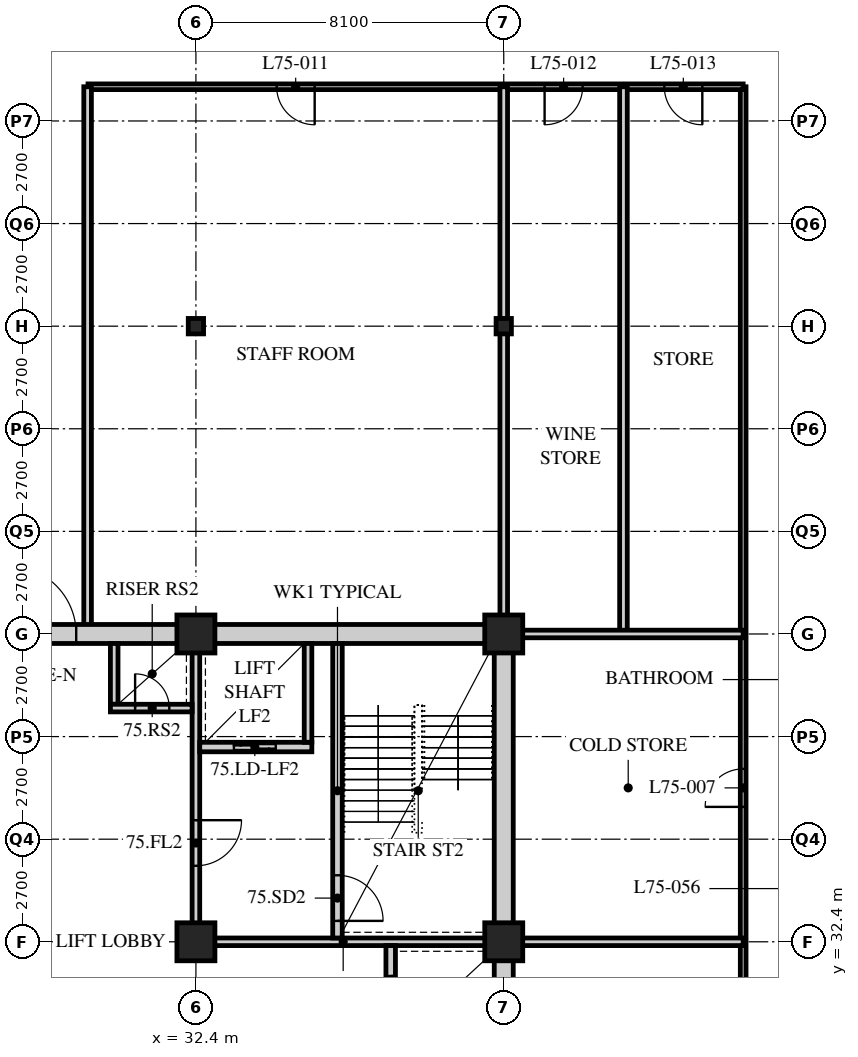
"""IFC4 building model, lengths in metres.
Left out: names, types, materials, properties, quantities, classifications, styles, units other than length and angle.
Written with IfcOpenShell. Run it as: python <this file> out.ifc"""

import sys

from ifc_helpers import new_model, si_unit, direction, frame, frame_2d, origin, origin_2d, place, context, subcontext, project, spatial, rectangle, hollow_rectangle, i_section, extrude, element, fill, save


model = new_model("IFC4")
c1 = context("Model", 3, precision=1e-05, world=origin(), true_north=direction((0.0, 1.0)))
c2 = subcontext(c1, "Body", "Model", "MODEL_VIEW")
j1 = project(units=[si_unit("LENGTHUNIT", "METRE"), si_unit("PLANEANGLEUNIT", "RADIAN")], contexts=[c1])
p1 = place(None, origin())
s1 = spatial("IfcSite", under=j1, at=p1, CompositionType="ELEMENT")
p2 = place(p1, origin())
s2 = spatial("IfcBuilding", under=s1, at=p2, CompositionType="ELEMENT")
p3 = place(p2, frame((0.0, 0.0, 293.1)))
s3 = spatial("IfcBuildingStorey", under=s2, at=p3, CompositionType="ELEMENT", Elevation=293.1)
for number, where, z_axis, x_axis in (
    (1, (32.4, 32.4, 0.0), (0.0, 0.0, 1.0), (1.0, 0.0, 0.0)),
    (2, (32.4, 40.5, 0.0), (0.0, 0.0, 1.0), (1.0, 0.0, 0.0)),
):
    element("IfcColumn", number, at=place(p3, frame(where, z_axis=z_axis, x_axis=x_axis)), inside=s3, PredefinedType="COLUMN", context=c2, shape_type="SweptSolid", body=[
        extrude(hollow_rectangle(XDim=1.0, YDim=1.0, WallThickness=0.1, at=origin_2d()), origin(), (0.0, 0.0, 1.0), 5.4),
    ])
p4 = place(p3, frame((32.4, 48.6, 0.0), z_axis=(0.0, 0.0, 1.0), x_axis=(1.0, 0.0, 0.0)))
e3 = element("IfcColumn", 3, at=p4, inside=s3, PredefinedType="COLUMN", context=c2, shape_type="SweptSolid", body=[
    extrude(i_section(OverallWidth=0.403, OverallDepth=0.406, WebThickness=0.027, FlangeThickness=0.043, FilletRadius=0.015, at=origin_2d()), origin(), (0.0, 0.0, 1.0), 5.4),
])
for number, where, z_axis, x_axis in (
    (4, (40.5, 32.4, 0.0), (0.0, 0.0, 1.0), (1.0, 0.0, 0.0)),
    (5, (40.5, 40.5, 0.0), (0.0, 0.0, 1.0), (1.0, 0.0, 0.0)),
):
    element("IfcColumn", number, at=place(p3, frame(where, z_axis=z_axis, x_axis=x_axis)), inside=s3, PredefinedType="COLUMN", context=c2, shape_type="SweptSolid", body=[
        extrude(hollow_rectangle(XDim=1.0, YDim=1.0, WallThickness=0.1, at=origin_2d()), origin(), (0.0, 0.0, 1.0), 5.4),
    ])
p5 = place(p3, frame((40.5, 48.6, 0.0), z_axis=(0.0, 0.0, 1.0), x_axis=(1.0, 0.0, 0.0)))
e6 = element("IfcColumn", 6, at=p5, inside=s3, PredefinedType="COLUMN", context=c2, shape_type="SweptSolid", body=[
    extrude(i_section(OverallWidth=0.403, OverallDepth=0.406, WebThickness=0.027, FlangeThickness=0.043, FilletRadius=0.015, at=origin_2d()), origin(), (0.0, 0.0, 1.0), 5.4),
])
p6 = place(p3, frame((46.8, 24.3, 0.0), z_axis=(0.0, 0.0, 1.0), x_axis=(0.0, 1.0, 0.0)))
e7 = element("IfcWall", 7, at=p6, inside=s3, PredefinedType="PARTITIONING", context=c2, shape_type="SweptSolid", body=[
    extrude(rectangle(XDim=30.6, YDim=0.15, at=frame_2d((15.3, 0.0))), origin(), (0.0, 0.0, 1.0), 5.19),
])
p7 = place(p6, frame((0.775, 0.0, 0.0)))
e8 = element("IfcOpeningElement", 8, at=p7, cuts=e7, PredefinedType="OPENING", context=c2, shape_type="SweptSolid", body=[
    extrude(rectangle(XDim=0.85, YDim=2.1, at=frame_2d((0.425, 1.05))), frame((0.0, 0.085, 0.0), z_axis=(0.0, -1.0, 0.0), x_axis=(1.0, 0.0, 0.0)), (0.0, 0.0, 1.0), 0.17),
])
p8 = place(p6, frame((4.75, 0.0, 0.0)))
e9 = element("IfcOpeningElement", 9, at=p8, cuts=e7, PredefinedType="OPENING", context=c2, shape_type="SweptSolid", body=[
    extrude(rectangle(XDim=1.0, YDim=2.1, at=frame_2d((0.5, 1.05))), frame((0.0, 0.085, 0.0), z_axis=(0.0, -1.0, 0.0), x_axis=(1.0, 0.0, 0.0)), (0.0, 0.0, 1.0), 0.17),
])
p9 = place(p6, frame((11.65, 0.0, 0.0)))
e10 = element("IfcOpeningElement", 10, at=p9, cuts=e7, PredefinedType="OPENING", context=c2, shape_type="SweptSolid", body=[
    extrude(rectangle(XDim=1.0, YDim=2.1, at=frame_2d((0.5, 1.05))), frame((0.0, 0.085, 0.0), z_axis=(0.0, -1.0, 0.0), x_axis=(1.0, 0.0, 0.0)), (0.0, 0.0, 1.0), 0.17),
])
p10 = place(p3, frame((46.8, 54.9, 0.0), z_axis=(0.0, 0.0, 1.0), x_axis=(-1.0, 0.0, 0.0)))
e11 = element("IfcWall", 11, at=p10, inside=s3, PredefinedType="PARTITIONING", context=c2, shape_type="SweptSolid", body=[
    extrude(rectangle(XDim=17.24, YDim=0.15, at=frame_2d((8.62, 0.0))), origin(), (0.0, 0.0, 1.0), 5.19),
])
p11 = place(p10, frame((11.275, 0.0, 0.0)))
e12 = element("IfcOpeningElement", 12, at=p11, cuts=e11, PredefinedType="OPENING", context=c2, shape_type="SweptSolid", body=[
    extrude(rectangle(XDim=1.0, YDim=2.1, at=frame_2d((0.5, 1.05))), frame((0.0, 0.085, 0.0), z_axis=(0.0, -1.0, 0.0), x_axis=(1.0, 0.0, 0.0)), (0.0, 0.0, 1.0), 0.17),
])
p12 = place(p10, frame((4.225, 0.0, 0.0)))
e13 = element("IfcOpeningElement", 13, at=p12, cuts=e11, PredefinedType="OPENING", context=c2, shape_type="SweptSolid", body=[
    extrude(rectangle(XDim=1.0, YDim=2.1, at=frame_2d((0.5, 1.05))), frame((0.0, 0.085, 0.0), z_axis=(0.0, -1.0, 0.0), x_axis=(1.0, 0.0, 0.0)), (0.0, 0.0, 1.0), 0.17),
])
p13 = place(p10, frame((1.075, 0.0, 0.0)))
e14 = element("IfcOpeningElement", 14, at=p13, cuts=e11, PredefinedType="OPENING", context=c2, shape_type="SweptSolid", body=[
    extrude(rectangle(XDim=1.0, YDim=2.1, at=frame_2d((0.5, 1.05))), frame((0.0, 0.085, 0.0), z_axis=(0.0, -1.0, 0.0), x_axis=(1.0, 0.0, 0.0)), (0.0, 0.0, 1.0), 0.17),
])
p14 = place(p3, frame((40.5, 32.4, 0.0), z_axis=(0.0, 0.0, 1.0), x_axis=(1.0, 0.0, 0.0)))
e15 = element("IfcWall", 15, at=p14, inside=s3, PredefinedType="SOLIDWALL", context=c2, shape_type="SweptSolid", body=[
    extrude(rectangle(XDim=6.3, YDim=0.2, at=frame_2d((3.15, 0.0))), origin(), (0.0, 0.0, 1.0), 4.271),
])
p15 = place(p3, frame((40.5, 40.5, 0.0), z_axis=(0.0, 0.0, 1.0), x_axis=(0.0, 1.0, 0.0)))
e16 = element("IfcWall", 16, at=p15, inside=s3, PredefinedType="SOLIDWALL", context=c2, shape_type="SweptSolid", body=[
    extrude(rectangle(XDim=14.4, YDim=0.2, at=frame_2d((7.2, 0.0))), origin(), (0.0, 0.0, 1.0), 4.271),
])
for number, where, z_axis, x_axis in (
    (17, (43.65, 54.9, 0.0), (0.0, 0.0, 1.0), (0.0, -1.0, 0.0)),
    (18, (29.55, 40.5, 0.0), (0.0, 0.0, 1.0), (0.0, 1.0, 0.0)),
):
    element("IfcWall", number, at=place(p3, frame(where, z_axis=z_axis, x_axis=x_axis)), inside=s3, PredefinedType="SOLIDWALL", context=c2, shape_type="SweptSolid", body=[
        extrude(rectangle(XDim=14.4, YDim=0.2, at=frame_2d((7.2, 0.0))), origin(), (0.0, 0.0, 1.0), 5.19),
    ])
p16 = place(p3, frame((40.5, 40.5, 0.0), z_axis=(0.0, 0.0, 1.0), x_axis=(1.0, 0.0, 0.0)))
e19 = element("IfcWall", 19, at=p16, inside=s3, PredefinedType="SOLIDWALL", context=c2, shape_type="SweptSolid", body=[
    extrude(rectangle(XDim=6.3, YDim=0.2, at=frame_2d((3.15, 0.0))), origin(), (0.0, 0.0, 1.0), 4.271),
])
p17 = place(p3, frame((15.95, 40.5, 0.0), z_axis=(0.0, 0.0, 1.0), x_axis=(1.0, 0.0, 0.0)))
e20 = element("IfcWall", 20, at=p17, inside=s3, PredefinedType="SOLIDWALL", context=c2, shape_type="SweptSolid", body=[
    extrude(rectangle(XDim=24.8, YDim=0.5, at=frame_2d((12.4, 0.0))), origin(), (0.0, 0.0, 1.0), 4.271),
])
p18 = place(p17, frame((11.5, 0.0, 0.0)))
e21 = element("IfcOpeningElement", 21, at=p18, cuts=e20, PredefinedType="OPENING", context=c2, shape_type="SweptSolid", body=[
    extrude(rectangle(XDim=1.8, YDim=2.4, at=frame_2d((0.9, 1.2))), frame((0.0, 0.26, 0.0), z_axis=(0.0, -1.0, 0.0), x_axis=(1.0, 0.0, 0.0)), (0.0, 0.0, 1.0), 0.52),
])
p19 = place(p3, frame((40.5, 24.55, 0.0), z_axis=(0.0, 0.0, 1.0), x_axis=(0.0, 1.0, 0.0)))
e22 = element("IfcWall", 22, at=p19, inside=s3, PredefinedType="SOLIDWALL", context=c2, shape_type="SweptSolid", body=[
    extrude(rectangle(XDim=15.7, YDim=0.5, at=frame_2d((7.85, 0.0))), origin(), (0.0, 0.0, 1.0), 4.271),
])
p20 = place(p3, frame((32.3, 32.4, 0.0), z_axis=(0.0, 0.0, 1.0), x_axis=(1.0, 0.0, 0.0)))
e23 = element("IfcWall", 23, at=p20, inside=s3, PredefinedType="SOLIDWALL", context=c2, shape_type="SweptSolid", body=[
    extrude(rectangle(XDim=7.95, YDim=0.2, at=frame_2d((3.975, 0.0))), origin(), (0.0, 0.0, 1.0), 4.428),
])
p21 = place(p3, frame((32.4, 32.5, 0.0), z_axis=(0.0, 0.0, 1.0), x_axis=(0.0, 1.0, 0.0)))
e24 = element("IfcWall", 24, at=p21, inside=s3, PredefinedType="SOLIDWALL", context=c2, shape_type="SweptSolid", body=[
    extrude(rectangle(XDim=7.75, YDim=0.2, at=frame_2d((3.875, 0.0))), origin(), (0.0, 0.0, 1.0), 4.428),
])
p22 = place(p21, frame((1.9, 0.0, 0.0)))
e25 = element("IfcOpeningElement", 25, at=p22, cuts=e24, PredefinedType="OPENING", context=c2, shape_type="SweptSolid", body=[
    extrude(rectangle(XDim=1.2, YDim=2.1, at=frame_2d((0.6, 1.05))), frame((0.0, 0.11, 0.0), z_axis=(0.0, -1.0, 0.0), x_axis=(1.0, 0.0, 0.0)), (0.0, 0.0, 1.0), 0.22),
])
p23 = place(p3, frame((37.525, 24.55, 0.0), z_axis=(0.0, 0.0, 1.0), x_axis=(0.0, 1.0, 0.0)))
e26 = element("IfcWall", 26, at=p23, inside=s3, PredefinedType="SOLIDWALL", context=c2, shape_type="SweptSolid", body=[
    extrude(rectangle(XDim=7.75, YDim=0.25, at=frame_2d((3.875, 0.0))), origin(), (0.0, 0.0, 1.0), 5.19),
])
p24 = place(p23, frame((0.65, 0.0, 0.0)))
e27 = element("IfcOpeningElement", 27, at=p24, cuts=e26, PredefinedType="OPENING", context=c2, shape_type="SweptSolid", body=[
    extrude(rectangle(XDim=1.1, YDim=2.4, at=frame_2d((0.55, 1.2))), frame((0.0, 0.135, 0.0), z_axis=(0.0, -1.0, 0.0), x_axis=(1.0, 0.0, 0.0)), (0.0, 0.0, 1.0), 0.27),
])
p25 = place(p23, frame((3.25, 0.0, 0.0)))
e28 = element("IfcOpeningElement", 28, at=p25, cuts=e26, PredefinedType="OPENING", context=c2, shape_type="SweptSolid", body=[
    extrude(rectangle(XDim=1.1, YDim=2.4, at=frame_2d((0.55, 1.2))), frame((0.0, 0.135, 0.0), z_axis=(0.0, -1.0, 0.0), x_axis=(1.0, 0.0, 0.0)), (0.0, 0.0, 1.0), 0.27),
])
p26 = place(p23, frame((5.85, 0.0, 0.0)))
e29 = element("IfcOpeningElement", 29, at=p26, cuts=e26, PredefinedType="OPENING", context=c2, shape_type="SweptSolid", body=[
    extrude(rectangle(XDim=1.1, YDim=2.4, at=frame_2d((0.55, 1.2))), frame((0.0, 0.135, 0.0), z_axis=(0.0, -1.0, 0.0), x_axis=(1.0, 0.0, 0.0)), (0.0, 0.0, 1.0), 0.27),
])
p27 = place(p3, frame((36.125, 32.5, 0.0), z_axis=(0.0, 0.0, 1.0), x_axis=(0.0, 1.0, 0.0)))
e30 = element("IfcWall", 30, at=p27, inside=s3, PredefinedType="SOLIDWALL", context=c2, shape_type="SweptSolid", body=[
    extrude(rectangle(XDim=7.75, YDim=0.25, at=frame_2d((3.875, 0.0))), origin(), (0.0, 0.0, 1.0), 5.19),
])
p28 = place(p27, frame((0.45, 0.0, 0.0)))
e31 = element("IfcOpeningElement", 31, at=p28, cuts=e30, PredefinedType="OPENING", context=c2, shape_type="SweptSolid", body=[
    extrude(rectangle(XDim=1.2, YDim=2.1, at=frame_2d((0.6, 1.05))), frame((0.0, 0.135, 0.0), z_axis=(0.0, -1.0, 0.0), x_axis=(1.0, 0.0, 0.0)), (0.0, 0.0, 1.0), 0.27),
])
p29 = place(p3, frame((32.5, 37.525, 0.0), z_axis=(0.0, 0.0, 1.0), x_axis=(1.0, 0.0, 0.0)))
e32 = element("IfcWall", 32, at=p29, inside=s3, PredefinedType="SOLIDWALL", context=c2, shape_type="SweptSolid", body=[
    extrude(rectangle(XDim=2.95, YDim=0.25, at=frame_2d((1.475, 0.0))), origin(), (0.0, 0.0, 1.0), 5.19),
])
p30 = place(p29, frame((0.9, 0.0, 0.0)))
e33 = element("IfcOpeningElement", 33, at=p30, cuts=e32, PredefinedType="OPENING", context=c2, shape_type="SweptSolid", body=[
    extrude(rectangle(XDim=1.1, YDim=2.4, at=frame_2d((0.55, 1.2))), frame((0.0, 0.135, 0.0), z_axis=(0.0, -1.0, 0.0), x_axis=(1.0, 0.0, 0.0)), (0.0, 0.0, 1.0), 0.27),
])
p31 = place(p3, frame((35.35, 37.65, 0.0), z_axis=(0.0, 0.0, 1.0), x_axis=(0.0, 1.0, 0.0)))
e34 = element("IfcWall", 34, at=p31, inside=s3, PredefinedType="SOLIDWALL", context=c2, shape_type="SweptSolid", body=[
    extrude(rectangle(XDim=2.6, YDim=0.2, at=frame_2d((1.3, 0.0))), origin(), (0.0, 0.0, 1.0), 5.19),
])
p32 = place(p3, frame((30.25, 38.65, 0.0), z_axis=(0.0, 0.0, 1.0), x_axis=(0.0, 1.0, 0.0)))
e35 = element("IfcWall", 35, at=p32, inside=s3, PredefinedType="SOLIDWALL", context=c2, shape_type="SweptSolid", body=[
    extrude(rectangle(XDim=1.6, YDim=0.2, at=frame_2d((0.8, 0.0))), origin(), (0.0, 0.0, 1.0), 5.19),
])
p33 = place(p3, frame((30.15, 38.55, 0.0), z_axis=(0.0, 0.0, 1.0), x_axis=(1.0, 0.0, 0.0)))
e36 = element("IfcWall", 36, at=p33, inside=s3, PredefinedType="SOLIDWALL", context=c2, shape_type="SweptSolid", body=[
    extrude(rectangle(XDim=2.15, YDim=0.2, at=frame_2d((1.075, 0.0))), origin(), (0.0, 0.0, 1.0), 5.19),
])
p34 = place(p33, frame((0.65, 0.0, 0.0)))
e37 = element("IfcOpeningElement", 37, at=p34, cuts=e36, PredefinedType="OPENING", context=c2, shape_type="SweptSolid", body=[
    extrude(rectangle(XDim=0.9, YDim=2.1, at=frame_2d((0.45, 1.05))), frame((0.0, 0.11, 0.0), z_axis=(0.0, -1.0, 0.0), x_axis=(1.0, 0.0, 0.0)), (0.0, 0.0, 1.0), 0.22),
])
p35 = place(p9, origin())
e38 = element("IfcDoor", 38, at=p35, inside=s3, OperationType="SINGLE_SWING_LEFT", PredefinedType="DOOR", context=c2, shape_type="SweptSolid", body=[
    extrude(rectangle(XDim=1.0, YDim=2.1, at=frame_2d((0.5, 1.05))), frame((0.0, 0.025, 0.0), z_axis=(0.0, -1.0, 0.0), x_axis=(1.0, 0.0, 0.0)), (0.0, 0.0, 1.0), 0.05),
])
fill(e10, e38)
p36 = place(p11, origin())
e39 = element("IfcDoor", 39, at=p36, inside=s3, OperationType="SINGLE_SWING_LEFT", PredefinedType="DOOR", context=c2, shape_type="SweptSolid", body=[
    extrude(rectangle(XDim=1.0, YDim=2.1, at=frame_2d((0.5, 1.05))), frame((0.0, 0.025, 0.0), z_axis=(0.0, -1.0, 0.0), x_axis=(1.0, 0.0, 0.0)), (0.0, 0.0, 1.0), 0.05),
])
fill(e12, e39)
p37 = place(p12, origin())
e40 = element("IfcDoor", 40, at=p37, inside=s3, OperationType="SINGLE_SWING_RIGHT", PredefinedType="DOOR", context=c2, shape_type="SweptSolid", body=[
    extrude(rectangle(XDim=1.0, YDim=2.1, at=frame_2d((0.5, 1.05))), frame((0.0, 0.025, 0.0), z_axis=(0.0, -1.0, 0.0), x_axis=(1.0, 0.0, 0.0)), (0.0, 0.0, 1.0), 0.05),
])
fill(e13, e40)
p38 = place(p13, origin())
e41 = element("IfcDoor", 41, at=p38, inside=s3, OperationType="SINGLE_SWING_LEFT", PredefinedType="DOOR", context=c2, shape_type="SweptSolid", body=[
    extrude(rectangle(XDim=1.0, YDim=2.1, at=frame_2d((0.5, 1.05))), frame((0.0, 0.025, 0.0), z_axis=(0.0, -1.0, 0.0), x_axis=(1.0, 0.0, 0.0)), (0.0, 0.0, 1.0), 0.05),
])
fill(e14, e41)
p39 = place(p28, origin())
e42 = element("IfcDoor", 42, at=p39, inside=s3, OperationType="SINGLE_SWING_RIGHT", PredefinedType="DOOR", context=c2, shape_type="SweptSolid", body=[
    extrude(rectangle(XDim=1.2, YDim=2.1, at=frame_2d((0.6, 1.05))), frame((0.0, 0.025, 0.0), z_axis=(0.0, -1.0, 0.0), x_axis=(1.0, 0.0, 0.0)), (0.0, 0.0, 1.0), 0.05),
])
fill(e31, e42)
p40 = place(p22, origin())
e43 = element("IfcDoor", 43, at=p40, inside=s3, OperationType="SINGLE_SWING_LEFT", PredefinedType="DOOR", context=c2, shape_type="SweptSolid", body=[
    extrude(rectangle(XDim=1.2, YDim=2.1, at=frame_2d((0.6, 1.05))), frame((0.0, 0.025, 0.0), z_axis=(0.0, -1.0, 0.0), x_axis=(1.0, 0.0, 0.0)), (0.0, 0.0, 1.0), 0.05),
])
fill(e25, e43)
p41 = place(p34, origin())
e44 = element("IfcDoor", 44, at=p41, inside=s3, OperationType="SINGLE_SWING_LEFT", PredefinedType="DOOR", context=c2, shape_type="SweptSolid", body=[
    extrude(rectangle(XDim=0.9, YDim=2.1, at=frame_2d((0.45, 1.05))), frame((0.0, 0.025, 0.0), z_axis=(0.0, -1.0, 0.0), x_axis=(1.0, 0.0, 0.0)), (0.0, 0.0, 1.0), 0.05),
])
fill(e37, e44)
p42 = place(p26, origin())
e45 = element("IfcDoor", 45, at=p42, inside=s3, OperationType="DOUBLE_DOOR_SLIDING", PredefinedType="DOOR", context=c2, shape_type="SweptSolid", body=[
    extrude(rectangle(XDim=1.1, YDim=2.4, at=frame_2d((0.55, 1.2))), frame((0.0, 0.025, 0.0), z_axis=(0.0, -1.0, 0.0), x_axis=(1.0, 0.0, 0.0)), (0.0, 0.0, 1.0), 0.05),
])
fill(e29, e45)
p43 = place(p30, origin())
e46 = element("IfcDoor", 46, at=p43, inside=s3, OperationType="DOUBLE_DOOR_SLIDING", PredefinedType="DOOR", context=c2, shape_type="SweptSolid", body=[
    extrude(rectangle(XDim=1.1, YDim=2.4, at=frame_2d((0.55, 1.2))), frame((0.0, 0.025, 0.0), z_axis=(0.0, -1.0, 0.0), x_axis=(1.0, 0.0, 0.0)), (0.0, 0.0, 1.0), 0.05),
])
fill(e33, e46)
p44 = place(p18, origin())
e47 = element("IfcDoor", 47, at=p44, inside=s3, OperationType="DOUBLE_DOOR_SINGLE_SWING", PredefinedType="DOOR", context=c2, shape_type="SweptSolid", body=[
    extrude(rectangle(XDim=1.8, YDim=2.4, at=frame_2d((0.9, 1.2))), frame((0.0, 0.025, 0.0), z_axis=(0.0, -1.0, 0.0), x_axis=(1.0, 0.0, 0.0)), (0.0, 0.0, 1.0), 0.05),
])
fill(e21, e47)
save(model, sys.argv[1])
